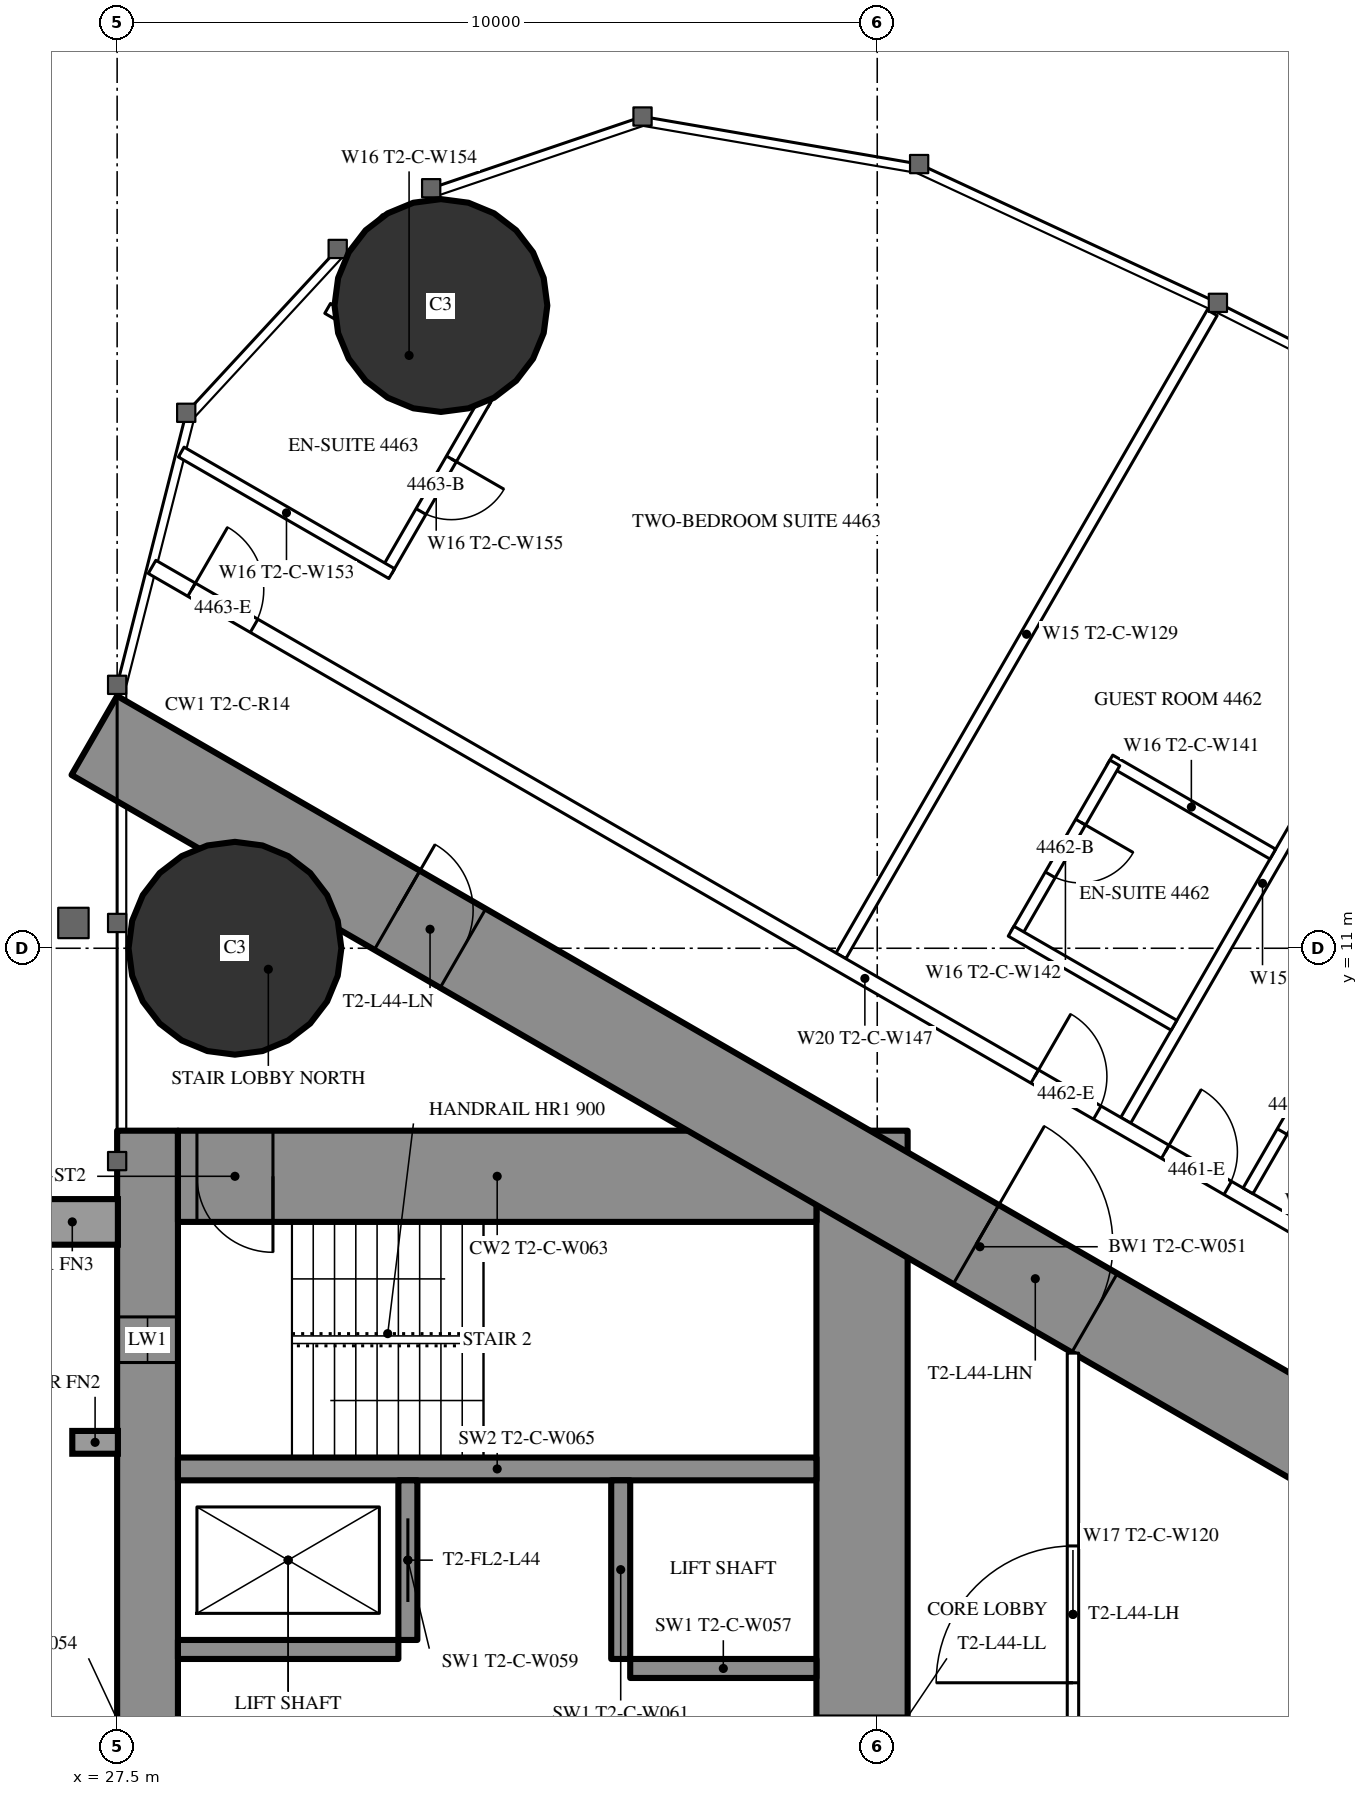
"""IFC4 building model, lengths in metres.
Left out: names, types, materials, properties, quantities, classifications, styles, units other than length and angle.
Written with IfcOpenShell. Run it as: python <this file> out.ifc"""

import sys

from ifc_helpers import new_model, si_unit, direction, frame, frame_2d, origin, origin_2d, place, context, subcontext, project, spatial, rectangle, circle, extrude, element, fill, save


model = new_model("IFC4")
c1 = context("Model", 3, precision=1e-05, world=origin(), true_north=direction((0.0, 1.0)))
c2 = subcontext(c1, "Body", "Model", "MODEL_VIEW")
j1 = project(units=[si_unit("LENGTHUNIT", "METRE"), si_unit("PLANEANGLEUNIT", "RADIAN")], contexts=[c1])
p1 = place(None, origin())
s1 = spatial("IfcSite", under=j1, at=p1, CompositionType="ELEMENT")
p2 = place(p1, origin())
s2 = spatial("IfcBuilding", under=s1, at=p2, CompositionType="ELEMENT")
p3 = place(p2, frame((0.0, 0.0, 166.8)))
s3 = spatial("IfcBuildingStorey", under=s2, at=p3, CompositionType="ELEMENT", Elevation=166.8)
for number, where, z_axis, x_axis in (
    (1, (31.76, 19.456, 0.0), (0.0, 0.0, 1.0), (1.0, 0.0, 0.0)),
    (2, (29.05, 11.0, 0.0), (0.0, 0.0, 1.0), (1.0, 0.0, 0.0)),
):
    element("IfcColumn", number, at=place(p3, frame(where, z_axis=z_axis, x_axis=x_axis)), inside=s3, PredefinedType="COLUMN", context=c2, shape_type="SweptSolid", body=[
        extrude(circle(Radius=1.4, at=origin_2d()), origin(), (0.0, 0.0, 1.0), 3.5),
    ])
p4 = place(p3, frame((27.9, -8.6, 0.0), z_axis=(0.0, 0.0, 1.0), x_axis=(0.0, 1.0, 0.0)))
e3 = element("IfcWall", 3, at=p4, inside=s3, PredefinedType="SHEAR", context=c2, shape_type="SweptSolid", body=[
    extrude(rectangle(XDim=17.2, YDim=0.8, at=frame_2d((8.6, 0.0))), origin(), (0.0, 0.0, 1.0), 3.5),
])
p5 = place(p4, frame((2.45, 0.0, 0.6)))
e4 = element("IfcOpeningElement", 4, at=p5, cuts=e3, PredefinedType="OPENING", context=c2, shape_type="SweptSolid", body=[
    extrude(rectangle(XDim=0.6, YDim=2.1, at=frame_2d((0.3, 1.05))), frame((0.0, 0.41, 0.0), z_axis=(0.0, -1.0, 0.0), x_axis=(1.0, 0.0, 0.0)), (0.0, 0.0, 1.0), 0.82),
])
p6 = place(p4, frame((14.15, 0.0, 0.6)))
e5 = element("IfcOpeningElement", 5, at=p6, cuts=e3, PredefinedType="OPENING", context=c2, shape_type="SweptSolid", body=[
    extrude(rectangle(XDim=0.6, YDim=2.1, at=frame_2d((0.3, 1.05))), frame((0.0, 0.41, 0.0), z_axis=(0.0, -1.0, 0.0), x_axis=(1.0, 0.0, 0.0)), (0.0, 0.0, 1.0), 0.82),
])
p7 = place(p3, frame((37.3, -8.6, 0.0), z_axis=(0.0, 0.0, 1.0), x_axis=(0.0, 1.0, 0.0)))
e6 = element("IfcWall", 6, at=p7, inside=s3, PredefinedType="SHEAR", context=c2, shape_type="SweptSolid", body=[
    extrude(rectangle(XDim=17.2, YDim=1.2, at=frame_2d((8.6, 0.0))), origin(), (0.0, 0.0, 1.0), 3.5),
])
p8 = place(p7, frame((7.7, 0.0, 0.0)))
e7 = element("IfcOpeningElement", 7, at=p8, cuts=e6, PredefinedType="OPENING", context=c2, shape_type="SweptSolid", body=[
    extrude(rectangle(XDim=1.8, YDim=2.2, at=frame_2d((0.9, 1.1))), frame((0.0, 0.61, 0.0), z_axis=(0.0, -1.0, 0.0), x_axis=(1.0, 0.0, 0.0)), (0.0, 0.0, 1.0), 1.22),
])
p9 = place(p3, frame((28.3, 8.0, 0.0), z_axis=(0.0, 0.0, 1.0), x_axis=(1.0, 0.0, 0.0)))
e8 = element("IfcWall", 8, at=p9, inside=s3, PredefinedType="SHEAR", context=c2, shape_type="SweptSolid", body=[
    extrude(rectangle(XDim=8.4, YDim=1.2, at=frame_2d((4.2, 0.0))), origin(), (0.0, 0.0, 1.0), 3.5),
])
p10 = place(p9, frame((0.25, 0.0, 0.0)))
e9 = element("IfcOpeningElement", 9, at=p10, cuts=e8, PredefinedType="OPENING", context=c2, shape_type="SweptSolid", body=[
    extrude(rectangle(XDim=1.0, YDim=2.2, at=frame_2d((0.5, 1.1))), frame((0.0, 0.61, 0.0), z_axis=(0.0, -1.0, 0.0), x_axis=(1.0, 0.0, 0.0)), (0.0, 0.0, 1.0), 1.22),
])
p11 = place(p3, frame((28.3, 4.15, 0.0), z_axis=(0.0, 0.0, 1.0), x_axis=(1.0, 0.0, 0.0)))
e10 = element("IfcWall", 10, at=p11, inside=s3, PredefinedType="SHEAR", context=c2, shape_type="SweptSolid", body=[
    extrude(rectangle(XDim=8.4, YDim=0.3, at=frame_2d((4.2, 0.0))), origin(), (0.0, 0.0, 1.0), 3.5),
])
p12 = place(p3, frame((31.325, 1.9, 0.0), z_axis=(0.0, 0.0, 1.0), x_axis=(0.0, 1.0, 0.0)))
e11 = element("IfcWall", 11, at=p12, inside=s3, PredefinedType="SHEAR", context=c2, shape_type="SweptSolid", body=[
    extrude(rectangle(XDim=2.1, YDim=0.25, at=frame_2d((1.05, 0.0))), origin(), (0.0, 0.0, 1.0), 3.5),
])
p13 = place(p12, frame((0.5, 0.0, 0.0)))
e12 = element("IfcOpeningElement", 12, at=p13, cuts=e11, PredefinedType="OPENING", context=c2, shape_type="SweptSolid", body=[
    extrude(rectangle(XDim=1.1, YDim=2.2, at=frame_2d((0.55, 1.1))), frame((0.0, 0.135, 0.0), z_axis=(0.0, -1.0, 0.0), x_axis=(1.0, 0.0, 0.0)), (0.0, 0.0, 1.0), 0.27),
])
p14 = place(p3, frame((34.125, 1.65, 0.0), z_axis=(0.0, 0.0, 1.0), x_axis=(0.0, 1.0, 0.0)))
e13 = element("IfcWall", 13, at=p14, inside=s3, PredefinedType="SHEAR", context=c2, shape_type="SweptSolid", body=[
    extrude(rectangle(XDim=2.35, YDim=0.25, at=frame_2d((1.175, 0.0))), origin(), (0.0, 0.0, 1.0), 3.5),
])
p15 = place(p3, frame((28.3, 1.775, 0.0), z_axis=(0.0, 0.0, 1.0), x_axis=(1.0, 0.0, 0.0)))
e14 = element("IfcWall", 14, at=p15, inside=s3, PredefinedType="SHEAR", context=c2, shape_type="SweptSolid", body=[
    extrude(rectangle(XDim=2.9, YDim=0.25, at=frame_2d((1.45, 0.0))), origin(), (0.0, 0.0, 1.0), 3.5),
])
p16 = place(p3, frame((34.25, 1.525, 0.0), z_axis=(0.0, 0.0, 1.0), x_axis=(1.0, 0.0, 0.0)))
e15 = element("IfcWall", 15, at=p16, inside=s3, PredefinedType="SHEAR", context=c2, shape_type="SweptSolid", body=[
    extrude(rectangle(XDim=2.45, YDim=0.25, at=frame_2d((1.225, 0.0))), origin(), (0.0, 0.0, 1.0), 3.5),
])
p17 = place(p3, frame((27.2, 13.8, 0.0), z_axis=(0.0, 0.0, 1.0), x_axis=(0.866024515034, -0.500001539357, 0.0)))
e16 = element("IfcWall", 16, at=p17, inside=s3, PredefinedType="SHEAR", context=c2, shape_type="SweptSolid", body=[
    extrude(rectangle(XDim=26.907, YDim=1.2, at=frame_2d((13.454, 0.0))), origin(), (0.0, 0.0, 1.0), 3.5),
])
p18 = place(p17, frame((4.6, 0.0, 0.0)))
e17 = element("IfcOpeningElement", 17, at=p18, cuts=e16, PredefinedType="OPENING", context=c2, shape_type="SweptSolid", body=[
    extrude(rectangle(XDim=1.0, YDim=2.2, at=frame_2d((0.5, 1.1))), frame((0.0, 0.61, 0.0), z_axis=(0.0, -1.0, 0.0), x_axis=(1.0, 0.0, 0.0)), (0.0, 0.0, 1.0), 1.22),
])
p19 = place(p17, frame((13.395, 0.0, 0.0)))
e18 = element("IfcOpeningElement", 18, at=p19, cuts=e16, PredefinedType="OPENING", context=c2, shape_type="SweptSolid", body=[
    extrude(rectangle(XDim=1.8, YDim=2.2, at=frame_2d((0.9, 1.1))), frame((0.0, 0.61, 0.0), z_axis=(0.0, -1.0, 0.0), x_axis=(1.0, 0.0, 0.0)), (0.0, 0.0, 1.0), 1.22),
])
p20 = place(p3, frame((37.022, 10.9, 0.0), z_axis=(0.0, 0.0, 1.0), x_axis=(0.499998620953, 0.866026199976, 0.0)))
e19 = element("IfcWall", 19, at=p20, inside=s3, PredefinedType="PARTITIONING", context=c2, shape_type="SweptSolid", body=[
    extrude(rectangle(XDim=9.77, YDim=0.15, at=frame_2d((4.885, 0.0))), origin(), (0.0, 0.0, 1.0), 3.25),
])
p21 = place(p3, frame((40.769, 8.737, 0.0), z_axis=(0.0, 0.0, 1.0), x_axis=(0.500013115284, 0.866017831539, 0.0)))
e20 = element("IfcWall", 20, at=p21, inside=s3, PredefinedType="PARTITIONING", context=c2, shape_type="SweptSolid", body=[
    extrude(rectangle(XDim=7.198, YDim=0.15, at=frame_2d((3.599, 0.0))), origin(), (0.0, 0.0, 1.0), 2.3),
])
p22 = place(p3, frame((27.959, 16.017, 0.0), z_axis=(0.0, 0.0, 1.0), x_axis=(0.866027146794, -0.499996981007, 0.0)))
e21 = element("IfcWall", 21, at=p22, inside=s3, PredefinedType="PARTITIONING", context=c2, shape_type="SweptSolid", body=[
    extrude(rectangle(XDim=21.657, YDim=0.2, at=frame_2d((10.829, 0.0))), origin(), (0.0, 0.0, 1.0), 3.25),
])
p23 = place(p22, frame((15.391, 0.0, 0.0)))
e22 = element("IfcOpeningElement", 22, at=p23, cuts=e21, PredefinedType="OPENING", context=c2, shape_type="SweptSolid", body=[
    extrude(rectangle(XDim=0.95, YDim=2.2, at=frame_2d((0.475, 1.1))), frame((0.0, 0.11, 0.0), z_axis=(0.0, -1.0, 0.0), x_axis=(1.0, 0.0, 0.0)), (0.0, 0.0, 1.0), 0.22),
])
p24 = place(p22, frame((13.409, 0.0, 0.0)))
e23 = element("IfcOpeningElement", 23, at=p24, cuts=e21, PredefinedType="OPENING", context=c2, shape_type="SweptSolid", body=[
    extrude(rectangle(XDim=0.95, YDim=2.2, at=frame_2d((0.475, 1.1))), frame((0.0, 0.11, 0.0), z_axis=(0.0, -1.0, 0.0), x_axis=(1.0, 0.0, 0.0)), (0.0, 0.0, 1.0), 0.22),
])
p25 = place(p22, frame((0.6, 0.0, 0.0)))
e24 = element("IfcOpeningElement", 24, at=p25, cuts=e21, PredefinedType="OPENING", context=c2, shape_type="SweptSolid", body=[
    extrude(rectangle(XDim=0.95, YDim=2.2, at=frame_2d((0.475, 1.1))), frame((0.0, 0.11, 0.0), z_axis=(0.0, -1.0, 0.0), x_axis=(1.0, 0.0, 0.0)), (0.0, 0.0, 1.0), 0.22),
])
p26 = place(p22, frame((19.349, 0.0, 0.0)))
e25 = element("IfcOpeningElement", 25, at=p26, cuts=e21, PredefinedType="OPENING", context=c2, shape_type="SweptSolid", body=[
    extrude(rectangle(XDim=1.8, YDim=2.2, at=frame_2d((0.9, 1.1))), frame((0.0, 0.11, 0.0), z_axis=(0.0, -1.0, 0.0), x_axis=(1.0, 0.0, 0.0)), (0.0, 0.0, 1.0), 0.22),
])
p27 = place(p3, frame((42.378, 7.808, 0.0), z_axis=(0.0, 0.0, 1.0), x_axis=(0.500006934395, 0.866021400173, 0.0)))
e26 = element("IfcWall", 26, at=p27, inside=s3, PredefinedType="PARTITIONING", context=c2, shape_type="SweptSolid", body=[
    extrude(rectangle(XDim=2.6, YDim=0.15, at=frame_2d((1.3, 0.0))), origin(), (0.0, 0.0, 1.0), 3.25),
])
p28 = place(p27, frame((0.9, 0.0, 0.0)))
e27 = element("IfcOpeningElement", 27, at=p28, cuts=e26, PredefinedType="OPENING", context=c2, shape_type="SweptSolid", body=[
    extrude(rectangle(XDim=0.8, YDim=2.2, at=frame_2d((0.4, 1.1))), frame((0.0, 0.085, 0.0), z_axis=(0.0, -1.0, 0.0), x_axis=(1.0, 0.0, 0.0)), (0.0, 0.0, 1.0), 0.17),
])
p29 = place(p3, frame((40.561, 13.476, 0.0), z_axis=(0.0, 0.0, 1.0), x_axis=(0.866006523861, -0.500032699561, 0.0)))
e28 = element("IfcWall", 28, at=p29, inside=s3, PredefinedType="PARTITIONING", context=c2, shape_type="SweptSolid", body=[
    extrude(rectangle(XDim=2.475, YDim=0.15, at=frame_2d((1.237, 0.0))), origin(), (0.0, 0.0, 1.0), 3.25),
])
p30 = place(p3, frame((39.326, 11.187, 0.0), z_axis=(0.0, 0.0, 1.0), x_axis=(0.500047596559, 0.865997922154, 0.0)))
e29 = element("IfcWall", 29, at=p30, inside=s3, PredefinedType="PARTITIONING", context=c2, shape_type="SweptSolid", body=[
    extrude(rectangle(XDim=2.6, YDim=0.15, at=frame_2d((1.3, 0.0))), origin(), (0.0, 0.0, 1.0), 3.25),
])
p31 = place(p30, frame((0.9, 0.0, 0.0)))
e30 = element("IfcOpeningElement", 30, at=p31, cuts=e29, PredefinedType="OPENING", context=c2, shape_type="SweptSolid", body=[
    extrude(rectangle(XDim=0.8, YDim=2.2, at=frame_2d((0.4, 1.1))), frame((0.0, 0.085, 0.0), z_axis=(0.0, -1.0, 0.0), x_axis=(1.0, 0.0, 0.0)), (0.0, 0.0, 1.0), 0.17),
])
for number, where, z_axis, x_axis in (
    (31, (39.261, 11.224, 0.0), (0.0, 0.0, 1.0), (0.866, -0.5, 0.0)),
    (32, (30.269, 19.418, 0.0), (0.0, 0.0, 1.0), (0.866, -0.5, 0.0)),
):
    element("IfcWall", number, at=place(p3, frame(where, z_axis=z_axis, x_axis=x_axis)), inside=s3, PredefinedType="PARTITIONING", context=c2, shape_type="SweptSolid", body=[
        extrude(rectangle(XDim=2.475, YDim=0.15, at=frame_2d((1.237, 0.0))), origin(), (0.0, 0.0, 1.0), 3.25),
    ])
p32 = place(p3, frame((31.048, 15.966, 0.0), z_axis=(0.0, 0.0, 1.0), x_axis=(0.499936506574, 0.866062058628, 0.0)))
e33 = element("IfcWall", 33, at=p32, inside=s3, PredefinedType="PARTITIONING", context=c2, shape_type="SweptSolid", body=[
    extrude(rectangle(XDim=2.6, YDim=0.15, at=frame_2d((1.3, 0.0))), origin(), (0.0, 0.0, 1.0), 2.3),
])
p33 = place(p32, frame((0.9, 0.0, 0.0)))
e34 = element("IfcOpeningElement", 34, at=p33, cuts=e33, PredefinedType="OPENING", context=c2, shape_type="SweptSolid", body=[
    extrude(rectangle(XDim=0.8, YDim=2.2, at=frame_2d((0.4, 1.1))), frame((0.0, 0.085, 0.0), z_axis=(0.0, -1.0, 0.0), x_axis=(1.0, 0.0, 0.0)), (0.0, 0.0, 1.0), 0.17),
])
p34 = place(p3, frame((28.343, 17.528, 0.0), z_axis=(0.0, 0.0, 1.0), x_axis=(0.86600760081, -0.500030834389, 0.0)))
e35 = element("IfcWall", 35, at=p34, inside=s3, PredefinedType="PARTITIONING", context=c2, shape_type="SweptSolid", body=[
    extrude(rectangle(XDim=3.198, YDim=0.15, at=frame_2d((1.599, 0.0))), origin(), (0.0, 0.0, 1.0), 3.25),
])
p35 = place(p3, frame((40.075, -1.2, 0.0), z_axis=(0.0, 0.0, 1.0), x_axis=(0.0, 1.0, 0.0)))
e36 = element("IfcWall", 36, at=p35, inside=s3, PredefinedType="PARTITIONING", context=c2, shape_type="SweptSolid", body=[
    extrude(rectangle(XDim=6.874, YDim=0.15, at=frame_2d((3.437, 0.0))), origin(), (0.0, 0.0, 1.0), 3.25),
])
p36 = place(p35, frame((2.537, 0.0, 0.0)))
e37 = element("IfcOpeningElement", 37, at=p36, cuts=e36, PredefinedType="OPENING", context=c2, shape_type="SweptSolid", body=[
    extrude(rectangle(XDim=1.8, YDim=2.2, at=frame_2d((0.9, 1.1))), frame((0.0, 0.085, 0.0), z_axis=(0.0, -1.0, 0.0), x_axis=(1.0, 0.0, 0.0)), (0.0, 0.0, 1.0), 0.17),
])
p37 = place(p28, origin())
e38 = element("IfcDoor", 38, at=p37, inside=s3, OperationType="SINGLE_SWING_RIGHT", PredefinedType="DOOR", context=c2, shape_type="SweptSolid", body=[
    extrude(rectangle(XDim=0.8, YDim=2.2, at=frame_2d((0.4, 1.1))), frame((0.0, 0.025, 0.0), z_axis=(0.0, -1.0, 0.0), x_axis=(1.0, 0.0, 0.0)), (0.0, 0.0, 1.0), 0.05),
])
fill(e27, e38)
p38 = place(p23, origin())
e39 = element("IfcDoor", 39, at=p38, inside=s3, OperationType="SINGLE_SWING_LEFT", PredefinedType="DOOR", context=c2, shape_type="SweptSolid", body=[
    extrude(rectangle(XDim=0.95, YDim=2.2, at=frame_2d((0.475, 1.1))), frame((0.0, 0.025, 0.0), z_axis=(0.0, -1.0, 0.0), x_axis=(1.0, 0.0, 0.0)), (0.0, 0.0, 1.0), 0.05),
])
fill(e22, e39)
p39 = place(p31, origin())
e40 = element("IfcDoor", 40, at=p39, inside=s3, OperationType="SINGLE_SWING_RIGHT", PredefinedType="DOOR", context=c2, shape_type="SweptSolid", body=[
    extrude(rectangle(XDim=0.8, YDim=2.2, at=frame_2d((0.4, 1.1))), frame((0.0, 0.025, 0.0), z_axis=(0.0, -1.0, 0.0), x_axis=(1.0, 0.0, 0.0)), (0.0, 0.0, 1.0), 0.05),
])
fill(e30, e40)
p40 = place(p24, origin())
e41 = element("IfcDoor", 41, at=p40, inside=s3, OperationType="SINGLE_SWING_LEFT", PredefinedType="DOOR", context=c2, shape_type="SweptSolid", body=[
    extrude(rectangle(XDim=0.95, YDim=2.2, at=frame_2d((0.475, 1.1))), frame((0.0, 0.025, 0.0), z_axis=(0.0, -1.0, 0.0), x_axis=(1.0, 0.0, 0.0)), (0.0, 0.0, 1.0), 0.05),
])
fill(e23, e41)
p41 = place(p33, origin())
e42 = element("IfcDoor", 42, at=p41, inside=s3, OperationType="SINGLE_SWING_RIGHT", PredefinedType="DOOR", context=c2, shape_type="SweptSolid", body=[
    extrude(rectangle(XDim=0.8, YDim=2.2, at=frame_2d((0.4, 1.1))), frame((0.0, 0.025, 0.0), z_axis=(0.0, -1.0, 0.0), x_axis=(1.0, 0.0, 0.0)), (0.0, 0.0, 1.0), 0.05),
])
fill(e34, e42)
p42 = place(p25, origin())
e43 = element("IfcDoor", 43, at=p42, inside=s3, OperationType="SINGLE_SWING_LEFT", PredefinedType="DOOR", context=c2, shape_type="SweptSolid", body=[
    extrude(rectangle(XDim=0.95, YDim=2.2, at=frame_2d((0.475, 1.1))), frame((0.0, 0.025, 0.0), z_axis=(0.0, -1.0, 0.0), x_axis=(1.0, 0.0, 0.0)), (0.0, 0.0, 1.0), 0.05),
])
fill(e24, e43)
p43 = place(p36, origin())
e44 = element("IfcDoor", 44, at=p43, inside=s3, OperationType="DOUBLE_DOOR_SINGLE_SWING", PredefinedType="DOOR", context=c2, shape_type="SweptSolid", body=[
    extrude(rectangle(XDim=1.8, YDim=2.2, at=frame_2d((0.9, 1.1))), frame((0.0, 0.025, 0.0), z_axis=(0.0, -1.0, 0.0), x_axis=(1.0, 0.0, 0.0)), (0.0, 0.0, 1.0), 0.05),
])
fill(e37, e44)
p44 = place(p18, origin())
e45 = element("IfcDoor", 45, at=p44, inside=s3, OperationType="SINGLE_SWING_LEFT", PredefinedType="DOOR", context=c2, shape_type="SweptSolid", body=[
    extrude(rectangle(XDim=1.0, YDim=2.2, at=frame_2d((0.5, 1.1))), frame((0.0, 0.025, 0.0), z_axis=(0.0, -1.0, 0.0), x_axis=(1.0, 0.0, 0.0)), (0.0, 0.0, 1.0), 0.05),
])
fill(e17, e45)
p45 = place(p19, origin())
e46 = element("IfcDoor", 46, at=p45, inside=s3, OperationType="DOUBLE_DOOR_SINGLE_SWING", PredefinedType="DOOR", context=c2, shape_type="SweptSolid", body=[
    extrude(rectangle(XDim=1.8, YDim=2.2, at=frame_2d((0.9, 1.1))), frame((0.0, 0.025, 0.0), z_axis=(0.0, -1.0, 0.0), x_axis=(1.0, 0.0, 0.0)), (0.0, 0.0, 1.0), 0.05),
])
fill(e18, e46)
p46 = place(p10, origin())
e47 = element("IfcDoor", 47, at=p46, inside=s3, OperationType="SINGLE_SWING_RIGHT", PredefinedType="DOOR", context=c2, shape_type="SweptSolid", body=[
    extrude(rectangle(XDim=1.0, YDim=2.2, at=frame_2d((0.5, 1.1))), frame((0.0, 0.025, 0.0), z_axis=(0.0, -1.0, 0.0), x_axis=(1.0, 0.0, 0.0)), (0.0, 0.0, 1.0), 0.05),
])
fill(e9, e47)
p47 = place(p13, origin())
e48 = element("IfcDoor", 48, at=p47, inside=s3, OperationType="SLIDING_TO_LEFT", PredefinedType="USERDEFINED", context=c2, shape_type="SweptSolid", body=[
    extrude(rectangle(XDim=1.1, YDim=2.2, at=frame_2d((0.55, 1.1))), frame((0.0, 0.025, 0.0), z_axis=(0.0, -1.0, 0.0), x_axis=(1.0, 0.0, 0.0)), (0.0, 0.0, 1.0), 0.05),
])
fill(e12, e48)
p48 = place(p6, origin())
e49 = element("IfcWindow", 49, at=p48, inside=s3, PartitioningType="SINGLE_PANEL", PredefinedType="WINDOW", context=c2, shape_type="SweptSolid", body=[
    extrude(rectangle(XDim=0.6, YDim=2.1, at=frame_2d((0.3, 1.05))), frame((0.0, 0.03, 0.0), z_axis=(0.0, -1.0, 0.0), x_axis=(1.0, 0.0, 0.0)), (0.0, 0.0, 1.0), 0.06),
])
fill(e5, e49)
save(model, sys.argv[1])
